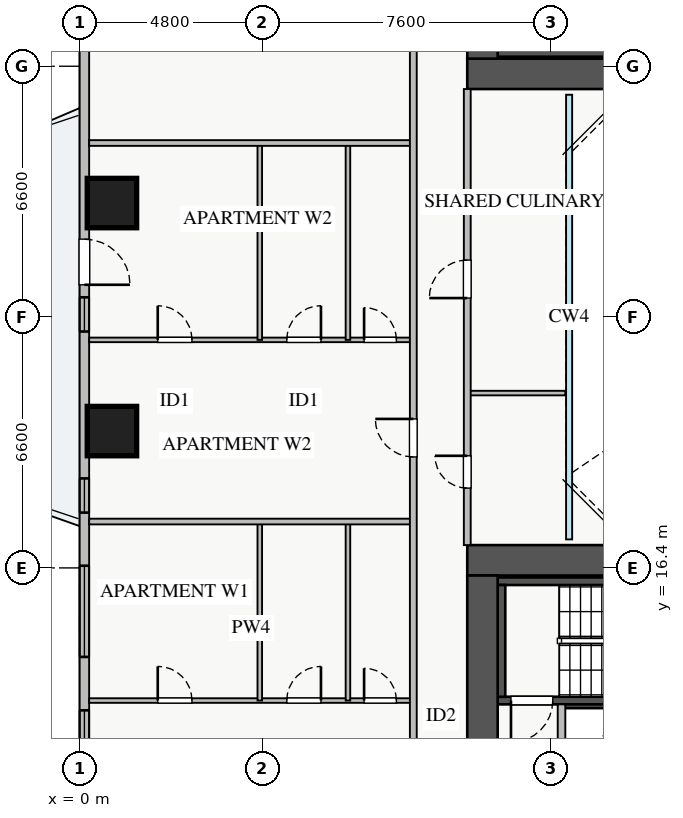
"""IFC4 building model, lengths in metres.
Left out: names, types, materials, properties, quantities, classifications, styles, units other than length and angle.
Written with IfcOpenShell. Run it as: python <this file> out.ifc"""

import sys

from ifc_helpers import new_model, si_unit, direction, frame, frame_2d, origin, origin_2d, place, context, subcontext, project, spatial, rectangle, extrude, source, transform, mapped, element, fill, save


model = new_model("IFC4")
c1 = context("Model", 3, precision=1e-05, world=origin(), true_north=direction((0.0, 1.0)))
c2 = subcontext(c1, "Body", "Model", "MODEL_VIEW")
j1 = project(units=[si_unit("LENGTHUNIT", "METRE"), si_unit("PLANEANGLEUNIT", "RADIAN")], contexts=[c1])
p1 = place(None, origin())
s1 = spatial("IfcSite", under=j1, at=p1, CompositionType="ELEMENT")
p2 = place(p1, origin())
s2 = spatial("IfcBuilding", under=s1, at=p2, CompositionType="ELEMENT")
p3 = place(p2, frame((0.0, 0.0, 69.75)))
s3 = spatial("IfcBuildingStorey", under=s2, at=p3, CompositionType="ELEMENT", Elevation=69.75)
p4 = place(p3, frame((12.68, 12.8, 0.0), z_axis=(0.0, 0.0, 1.0), x_axis=(1.0, 0.0, 0.0)))
e1 = element("IfcWall", 1, at=p4, inside=s3, PredefinedType="SHEAR", context=c2, shape_type="SweptSolid", body=[
    extrude(rectangle(XDim=1.94, YDim=0.18, at=frame_2d((0.97, 0.0))), origin(), (0.0, 0.0, 1.0), 3.07),
])
p5 = place(p3, frame((11.0, 29.95, 0.0), z_axis=(0.0, 0.0, 1.0), x_axis=(1.0, 0.0, 0.0)))
e2 = element("IfcWall", 2, at=p5, inside=s3, PredefinedType="SHEAR", context=c2, shape_type="SweptSolid", body=[
    extrude(rectangle(XDim=7.15, YDim=0.2, at=frame_2d((3.575, 0.0))), origin(), (0.0, 0.0, 1.0), 3.25),
])
p6 = place(p3, frame((11.0, 12.91, 0.0), z_axis=(0.0, 0.0, 1.0), x_axis=(1.0, 0.0, 0.0)))
e3 = element("IfcWall", 3, at=p6, inside=s3, PredefinedType="SHEAR", context=c2, shape_type="SweptSolid", body=[
    extrude(rectangle(XDim=7.15, YDim=0.2, at=frame_2d((3.575, 0.0))), origin(), (0.0, 0.0, 1.0), 3.25),
])
p7 = place(p6, frame((0.35, 0.0, 0.0)))
e4 = element("IfcOpeningElement", 4, at=p7, cuts=e3, PredefinedType="OPENING", context=c2, shape_type="SweptSolid", body=[
    extrude(rectangle(XDim=1.1, YDim=2.05, at=frame_2d((0.55, 1.025))), frame((0.0, 0.11, 0.0), z_axis=(0.0, -1.0, 0.0), x_axis=(1.0, 0.0, 0.0)), (0.0, 0.0, 1.0), 0.22),
])
p8 = place(p3, frame((11.0, 16.05, 0.0), z_axis=(0.0, 0.0, 1.0), x_axis=(1.0, 0.0, 0.0)))
e5 = element("IfcWall", 5, at=p8, inside=s3, PredefinedType="SHEAR", context=c2, shape_type="SweptSolid", body=[
    extrude(rectangle(XDim=7.15, YDim=0.2, at=frame_2d((3.575, 0.0))), origin(), (0.0, 0.0, 1.0), 3.25),
])
p9 = place(p3, frame((11.1, 13.01, 0.0), z_axis=(0.0, 0.0, 1.0), x_axis=(0.0, 1.0, 0.0)))
e6 = element("IfcWall", 6, at=p9, inside=s3, PredefinedType="SHEAR", context=c2, shape_type="SweptSolid", body=[
    extrude(rectangle(XDim=2.94, YDim=0.2, at=frame_2d((1.47, 0.0))), origin(), (0.0, 0.0, 1.0), 3.25),
])
p10 = place(p3, frame((10.2, 29.4, 0.0), z_axis=(0.0, 0.0, 1.0), x_axis=(1.0, 0.0, 0.0)))
e7 = element("IfcWall", 7, at=p10, inside=s3, PredefinedType="SHEAR", context=c2, shape_type="SweptSolid", body=[
    extrude(rectangle(XDim=17.6, YDim=0.8, at=frame_2d((8.8, 0.0))), origin(), (0.0, 0.0, 1.0), 3.25),
])
p11 = place(p3, frame((10.6, 29.8, 0.0), z_axis=(0.0, 0.0, 1.0), x_axis=(0.0, 1.0, 0.0)))
e8 = element("IfcWall", 8, at=p11, inside=s3, PredefinedType="SHEAR", context=c2, shape_type="SweptSolid", body=[
    extrude(rectangle(XDim=5.6, YDim=0.8, at=frame_2d((2.8, 0.0))), origin(), (0.0, 0.0, 1.0), 3.25),
])
p12 = place(p3, frame((10.2, 16.6, 0.0), z_axis=(0.0, 0.0, 1.0), x_axis=(1.0, 0.0, 0.0)))
e9 = element("IfcWall", 9, at=p12, inside=s3, PredefinedType="SHEAR", context=c2, shape_type="SweptSolid", body=[
    extrude(rectangle(XDim=17.6, YDim=0.8, at=frame_2d((8.8, 0.0))), origin(), (0.0, 0.0, 1.0), 3.25),
])
p13 = place(p3, frame((10.6, 10.6, 0.0), z_axis=(0.0, 0.0, 1.0), x_axis=(0.0, 1.0, 0.0)))
e10 = element("IfcWall", 10, at=p13, inside=s3, PredefinedType="SHEAR", context=c2, shape_type="SweptSolid", body=[
    extrude(rectangle(XDim=5.6, YDim=0.8, at=frame_2d((2.8, 0.0))), origin(), (0.0, 0.0, 1.0), 3.25),
])
m1 = source(origin(), c2, "Body", "SweptSolid", [
    extrude(rectangle(XDim=1.3, YDim=1.3, at=origin_2d()), origin(), (0.0, 0.0, 1.0), 3.25),
])
for number, where, z_axis, x_axis in (
    (11, (0.85, 26.0, 0.0), (0.0, 0.0, 1.0), (1.0, 0.0, 0.0)),
    (12, (0.85, 20.0, 0.0), (0.0, 0.0, 1.0), (1.0, 0.0, 0.0)),
):
    element("IfcColumn", number, at=place(p3, frame(where, z_axis=z_axis, x_axis=x_axis)), inside=s3, PredefinedType="COLUMN", context=c2, shape_type="MappedRepresentation", body=[
        mapped(m1, transform((0.0, 0.0, 0.0), x_axis=(1.0, 0.0, 0.0), y_axis=(0.0, 1.0, 0.0), z_axis=(0.0, 0.0, 1.0), scale=1.0)),
    ])
p14 = place(p3, frame((0.125, 9.45, 0.0), z_axis=(0.0, 0.0, 1.0), x_axis=(0.0, 1.0, 0.0)))
e13 = element("IfcWall", 13, at=p14, inside=s3, PredefinedType="STANDARD", context=c2, shape_type="SweptSolid", body=[
    extrude(rectangle(XDim=27.1, YDim=0.25, at=frame_2d((13.55, 0.0))), origin(), (0.0, 0.0, 1.0), 2.61),
])
p15 = place(p14, frame((14.4, 0.0, 0.0)))
e14 = element("IfcOpeningElement", 14, at=p15, cuts=e13, PredefinedType="OPENING", context=c2, shape_type="SweptSolid", body=[
    extrude(rectangle(XDim=1.2, YDim=2.1, at=frame_2d((0.6, 1.05))), frame((0.0, 0.135, 0.0), z_axis=(0.0, -1.0, 0.0), x_axis=(1.0, 0.0, 0.0)), (0.0, 0.0, 1.0), 0.27),
])
p16 = place(p14, frame((1.403, 0.0, 0.9)))
e15 = element("IfcOpeningElement", 15, at=p16, cuts=e13, PredefinedType="OPENING", context=c2, shape_type="SweptSolid", body=[
    extrude(rectangle(XDim=1.8, YDim=1.5, at=frame_2d((0.9, 0.75))), frame((0.0, 0.135, 0.0), z_axis=(0.0, -1.0, 0.0), x_axis=(1.0, 0.0, 0.0)), (0.0, 0.0, 1.0), 0.27),
])
p17 = place(p14, frame((22.663, 0.0, 0.9)))
e16 = element("IfcOpeningElement", 16, at=p17, cuts=e13, PredefinedType="OPENING", context=c2, shape_type="SweptSolid", body=[
    extrude(rectangle(XDim=2.1, YDim=1.48, at=frame_2d((1.05, 0.74))), frame((0.0, 0.135, 0.0), z_axis=(0.0, -1.0, 0.0), x_axis=(1.0, 0.0, 0.0)), (0.0, 0.0, 1.0), 0.27),
])
p18 = place(p14, frame((4.607, 0.0, 0.9)))
e17 = element("IfcOpeningElement", 17, at=p18, cuts=e13, PredefinedType="OPENING", context=c2, shape_type="SweptSolid", body=[
    extrude(rectangle(XDim=2.4, YDim=1.5, at=frame_2d((1.2, 0.75))), frame((0.0, 0.135, 0.0), z_axis=(0.0, -1.0, 0.0), x_axis=(1.0, 0.0, 0.0)), (0.0, 0.0, 1.0), 0.27),
])
p19 = place(p14, frame((13.17, 0.0, 0.9)))
e18 = element("IfcOpeningElement", 18, at=p19, cuts=e13, PredefinedType="OPENING", context=c2, shape_type="SweptSolid", body=[
    extrude(rectangle(XDim=0.9, YDim=1.2, at=frame_2d((0.45, 0.6))), frame((0.0, 0.135, 0.0), z_axis=(0.0, -1.0, 0.0), x_axis=(1.0, 0.0, 0.0)), (0.0, 0.0, 1.0), 0.27),
])
p20 = place(p14, frame((8.405, 0.0, 0.9)))
e19 = element("IfcOpeningElement", 19, at=p20, cuts=e13, PredefinedType="OPENING", context=c2, shape_type="SweptSolid", body=[
    extrude(rectangle(XDim=0.9, YDim=1.2, at=frame_2d((0.45, 0.6))), frame((0.0, 0.135, 0.0), z_axis=(0.0, -1.0, 0.0), x_axis=(1.0, 0.0, 0.0)), (0.0, 0.0, 1.0), 0.27),
])
p21 = place(p3, frame((12.68, 10.6, 0.0), z_axis=(0.0, 0.0, 1.0), x_axis=(0.0, 1.0, 0.0)))
e20 = element("IfcWall", 20, at=p21, inside=s3, PredefinedType="PARTITIONING", context=c2, shape_type="SweptSolid", body=[
    extrude(rectangle(XDim=2.21, YDim=0.2, at=frame_2d((1.105, 0.0))), origin(), (0.0, 0.0, 1.0), 3.07),
])
p22 = place(p3, frame((0.25, 12.91, 0.0), z_axis=(0.0, 0.0, 1.0), x_axis=(1.0, 0.0, 0.0)))
e21 = element("IfcWall", 21, at=p22, inside=s3, PredefinedType="PLUMBINGWALL", context=c2, shape_type="SweptSolid", body=[
    extrude(rectangle(XDim=8.53, YDim=0.12, at=frame_2d((4.265, 0.0))), origin(), (0.0, 0.0, 1.0), 3.07),
])
p23 = place(p22, frame((1.805, 0.0, 0.0)))
e22 = element("IfcOpeningElement", 22, at=p23, cuts=e21, PredefinedType="OPENING", context=c2, shape_type="SweptSolid", body=[
    extrude(rectangle(XDim=0.9, YDim=2.05, at=frame_2d((0.45, 1.025))), frame((0.0, 0.07, 0.0), z_axis=(0.0, -1.0, 0.0), x_axis=(1.0, 0.0, 0.0)), (0.0, 0.0, 1.0), 0.14),
])
p24 = place(p22, frame((5.2, 0.0, 0.0)))
e23 = element("IfcOpeningElement", 23, at=p24, cuts=e21, PredefinedType="OPENING", context=c2, shape_type="SweptSolid", body=[
    extrude(rectangle(XDim=0.9, YDim=2.05, at=frame_2d((0.45, 1.025))), frame((0.0, 0.07, 0.0), z_axis=(0.0, -1.0, 0.0), x_axis=(1.0, 0.0, 0.0)), (0.0, 0.0, 1.0), 0.14),
])
p25 = place(p22, frame((7.235, 0.0, 0.0)))
e24 = element("IfcOpeningElement", 24, at=p25, cuts=e21, PredefinedType="OPENING", context=c2, shape_type="SweptSolid", body=[
    extrude(rectangle(XDim=0.85, YDim=2.05, at=frame_2d((0.425, 1.025))), frame((0.0, 0.07, 0.0), z_axis=(0.0, -1.0, 0.0), x_axis=(1.0, 0.0, 0.0)), (0.0, 0.0, 1.0), 0.14),
])
for number, where, z_axis, x_axis in (
    (25, (4.74, 12.91, 0.0), (0.0, 0.0, 1.0), (0.0, 1.0, 0.0)),
    (26, (7.06, 12.91, 0.0), (0.0, 0.0, 1.0), (0.0, 1.0, 0.0)),
):
    element("IfcWall", number, at=place(p3, frame(where, z_axis=z_axis, x_axis=x_axis)), inside=s3, PredefinedType="PLUMBINGWALL", context=c2, shape_type="SweptSolid", body=[
        extrude(rectangle(XDim=4.71, YDim=0.12, at=frame_2d((2.355, 0.0))), origin(), (0.0, 0.0, 1.0), 3.07),
    ])
p26 = place(p3, frame((0.25, 22.4, 0.0), z_axis=(0.0, 0.0, 1.0), x_axis=(1.0, 0.0, 0.0)))
e27 = element("IfcWall", 27, at=p26, inside=s3, PredefinedType="PLUMBINGWALL", context=c2, shape_type="SweptSolid", body=[
    extrude(rectangle(XDim=8.53, YDim=0.12, at=frame_2d((4.265, 0.0))), origin(), (0.0, 0.0, 1.0), 3.07),
])
p27 = place(p26, frame((1.805, 0.0, 0.0)))
e28 = element("IfcOpeningElement", 28, at=p27, cuts=e27, PredefinedType="OPENING", context=c2, shape_type="SweptSolid", body=[
    extrude(rectangle(XDim=0.9, YDim=2.05, at=frame_2d((0.45, 1.025))), frame((0.0, 0.07, 0.0), z_axis=(0.0, -1.0, 0.0), x_axis=(1.0, 0.0, 0.0)), (0.0, 0.0, 1.0), 0.14),
])
p28 = place(p26, frame((5.2, 0.0, 0.0)))
e29 = element("IfcOpeningElement", 29, at=p28, cuts=e27, PredefinedType="OPENING", context=c2, shape_type="SweptSolid", body=[
    extrude(rectangle(XDim=0.9, YDim=2.05, at=frame_2d((0.45, 1.025))), frame((0.0, 0.07, 0.0), z_axis=(0.0, -1.0, 0.0), x_axis=(1.0, 0.0, 0.0)), (0.0, 0.0, 1.0), 0.14),
])
p29 = place(p26, frame((7.235, 0.0, 0.0)))
e30 = element("IfcOpeningElement", 30, at=p29, cuts=e27, PredefinedType="OPENING", context=c2, shape_type="SweptSolid", body=[
    extrude(rectangle(XDim=0.85, YDim=2.05, at=frame_2d((0.425, 1.025))), frame((0.0, 0.07, 0.0), z_axis=(0.0, -1.0, 0.0), x_axis=(1.0, 0.0, 0.0)), (0.0, 0.0, 1.0), 0.14),
])
for number, where, z_axis, x_axis in (
    (31, (4.74, 22.4, 0.0), (0.0, 0.0, 1.0), (0.0, 1.0, 0.0)),
    (32, (7.06, 22.4, 0.0), (0.0, 0.0, 1.0), (0.0, 1.0, 0.0)),
):
    element("IfcWall", number, at=place(p3, frame(where, z_axis=z_axis, x_axis=x_axis)), inside=s3, PredefinedType="PLUMBINGWALL", context=c2, shape_type="SweptSolid", body=[
        extrude(rectangle(XDim=5.18, YDim=0.12, at=frame_2d((2.59, 0.0))), origin(), (0.0, 0.0, 1.0), 3.07),
    ])
p30 = place(p3, frame((0.25, 17.62, 0.0), z_axis=(0.0, 0.0, 1.0), x_axis=(1.0, 0.0, 0.0)))
e33 = element("IfcWall", 33, at=p30, inside=s3, PredefinedType="PARTITIONING", context=c2, shape_type="SweptSolid", body=[
    extrude(rectangle(XDim=8.53, YDim=0.15, at=frame_2d((4.265, 0.0))), origin(), (0.0, 0.0, 1.0), 3.07),
])
p31 = place(p3, frame((0.25, 27.58, 0.0), z_axis=(0.0, 0.0, 1.0), x_axis=(1.0, 0.0, 0.0)))
e34 = element("IfcWall", 34, at=p31, inside=s3, PredefinedType="PARTITIONING", context=c2, shape_type="SweptSolid", body=[
    extrude(rectangle(XDim=8.53, YDim=0.15, at=frame_2d((4.265, 0.0))), origin(), (0.0, 0.0, 1.0), 2.821),
])
p32 = place(p3, frame((8.78, 7.21, 0.0), z_axis=(0.0, 0.0, 1.0), x_axis=(0.0, 1.0, 0.0)))
e35 = element("IfcWall", 35, at=p32, inside=s3, PredefinedType="PARTITIONING", context=c2, shape_type="SweptSolid", body=[
    extrude(rectangle(XDim=31.23, YDim=0.18, at=frame_2d((15.615, 0.0))), origin(), (0.0, 0.0, 1.0), 3.07),
])
p33 = place(p32, frame((30.09, 0.0, 0.0)))
e36 = element("IfcOpeningElement", 36, at=p33, cuts=e35, PredefinedType="OPENING", context=c2, shape_type="SweptSolid", body=[
    extrude(rectangle(XDim=0.9, YDim=2.05, at=frame_2d((0.45, 1.025))), frame((0.0, 0.1, 0.0), z_axis=(0.0, -1.0, 0.0), x_axis=(1.0, 0.0, 0.0)), (0.0, 0.0, 1.0), 0.2),
])
p34 = place(p32, frame((0.24, 0.0, 0.0)))
e37 = element("IfcOpeningElement", 37, at=p34, cuts=e35, PredefinedType="OPENING", context=c2, shape_type="SweptSolid", body=[
    extrude(rectangle(XDim=0.9, YDim=2.05, at=frame_2d((0.45, 1.025))), frame((0.0, 0.1, 0.0), z_axis=(0.0, -1.0, 0.0), x_axis=(1.0, 0.0, 0.0)), (0.0, 0.0, 1.0), 0.2),
])
p35 = place(p32, frame((2.84, 0.0, 0.0)))
e38 = element("IfcOpeningElement", 38, at=p35, cuts=e35, PredefinedType="OPENING", context=c2, shape_type="SweptSolid", body=[
    extrude(rectangle(XDim=1.0, YDim=2.05, at=frame_2d((0.5, 1.025))), frame((0.0, 0.1, 0.0), z_axis=(0.0, -1.0, 0.0), x_axis=(1.0, 0.0, 0.0)), (0.0, 0.0, 1.0), 0.2),
])
p36 = place(p32, frame((12.11, 0.0, 0.0)))
e39 = element("IfcOpeningElement", 39, at=p36, cuts=e35, PredefinedType="OPENING", context=c2, shape_type="SweptSolid", body=[
    extrude(rectangle(XDim=1.0, YDim=2.05, at=frame_2d((0.5, 1.025))), frame((0.0, 0.1, 0.0), z_axis=(0.0, -1.0, 0.0), x_axis=(1.0, 0.0, 0.0)), (0.0, 0.0, 1.0), 0.2),
])
p37 = place(p32, frame((24.62, 0.0, 0.0)))
e40 = element("IfcOpeningElement", 40, at=p37, cuts=e35, PredefinedType="OPENING", context=c2, shape_type="SweptSolid", body=[
    extrude(rectangle(XDim=1.0, YDim=2.05, at=frame_2d((0.5, 1.025))), frame((0.0, 0.1, 0.0), z_axis=(0.0, -1.0, 0.0), x_axis=(1.0, 0.0, 0.0)), (0.0, 0.0, 1.0), 0.2),
])
p38 = place(p3, frame((10.2, 21.0, 0.0), z_axis=(0.0, 0.0, 1.0), x_axis=(1.0, 0.0, 0.0)))
e41 = element("IfcWall", 41, at=p38, inside=s3, PredefinedType="PLUMBINGWALL", context=c2, shape_type="SweptSolid", body=[
    extrude(rectangle(XDim=2.58, YDim=0.12, at=frame_2d((1.29, 0.0))), origin(), (0.0, 0.0, 1.0), 3.07),
])
p39 = place(p3, frame((10.2, 17.0, 0.0), z_axis=(0.0, 0.0, 1.0), x_axis=(0.0, 1.0, 0.0)))
e42 = element("IfcWall", 42, at=p39, inside=s3, PredefinedType="PARTITIONING", context=c2, shape_type="SweptSolid", body=[
    extrude(rectangle(XDim=12.0, YDim=0.18, at=frame_2d((6.0, 0.0))), origin(), (0.0, 0.0, 1.0), 3.07),
])
p40 = place(p39, frame((1.5, 0.0, 0.0)))
e43 = element("IfcOpeningElement", 43, at=p40, cuts=e42, PredefinedType="OPENING", context=c2, shape_type="SweptSolid", body=[
    extrude(rectangle(XDim=0.85, YDim=2.05, at=frame_2d((0.425, 1.025))), frame((0.0, 0.1, 0.0), z_axis=(0.0, -1.0, 0.0), x_axis=(1.0, 0.0, 0.0)), (0.0, 0.0, 1.0), 0.2),
])
p41 = place(p39, frame((6.5, 0.0, 0.0)))
e44 = element("IfcOpeningElement", 44, at=p41, cuts=e42, PredefinedType="OPENING", context=c2, shape_type="SweptSolid", body=[
    extrude(rectangle(XDim=1.0, YDim=2.05, at=frame_2d((0.5, 1.025))), frame((0.0, 0.1, 0.0), z_axis=(0.0, -1.0, 0.0), x_axis=(1.0, 0.0, 0.0)), (0.0, 0.0, 1.0), 0.2),
])
m2 = source(origin(), c2, "Body", "SweptSolid", [
    extrude(rectangle(XDim=1.2, YDim=2.1, at=frame_2d((0.6, 1.05))), frame((0.0, 0.025, 0.0), z_axis=(0.0, -1.0, 0.0), x_axis=(1.0, 0.0, 0.0)), (0.0, 0.0, 1.0), 0.05),
])
p42 = place(p15, frame((1.2, 0.0, 0.0), z_axis=(0.0, 0.0, 1.0), x_axis=(-1.0, 0.0, 0.0)))
e45 = element("IfcDoor", 45, at=p42, inside=s3, OperationType="SINGLE_SWING_LEFT", PredefinedType="DOOR", context=c2, shape_type="MappedRepresentation", body=[
    mapped(m2, transform((0.0, 0.0, 0.0), x_axis=(1.0, 0.0, 0.0), y_axis=(0.0, 1.0, 0.0), z_axis=(0.0, 0.0, 1.0), scale=1.0)),
])
fill(e14, e45)
m3 = source(origin(), c2, "Body", "SweptSolid", [
    extrude(rectangle(XDim=1.8, YDim=1.5, at=frame_2d((0.9, 0.75))), frame((0.0, 0.03, 0.0), z_axis=(0.0, -1.0, 0.0), x_axis=(1.0, 0.0, 0.0)), (0.0, 0.0, 1.0), 0.06),
])
p43 = place(p16, origin())
e46 = element("IfcWindow", 46, at=p43, inside=s3, PartitioningType="TRIPLE_PANEL_VERTICAL", PredefinedType="WINDOW", context=c2, shape_type="MappedRepresentation", body=[
    mapped(m3, transform((0.0, 0.0, 0.0), x_axis=(1.0, 0.0, 0.0), y_axis=(0.0, 1.0, 0.0), z_axis=(0.0, 0.0, 1.0), scale=1.0)),
])
fill(e15, e46)
m4 = source(origin(), c2, "Body", "SweptSolid", [
    extrude(rectangle(XDim=1.1, YDim=2.05, at=frame_2d((0.55, 1.025))), frame((0.0, 0.025, 0.0), z_axis=(0.0, -1.0, 0.0), x_axis=(1.0, 0.0, 0.0)), (0.0, 0.0, 1.0), 0.05),
])
p44 = place(p7, frame((1.1, 0.0, 0.0), z_axis=(0.0, 0.0, 1.0), x_axis=(-1.0, 0.0, 0.0)))
e47 = element("IfcDoor", 47, at=p44, inside=s3, OperationType="SINGLE_SWING_LEFT", PredefinedType="DOOR", context=c2, shape_type="MappedRepresentation", body=[
    mapped(m4, transform((0.0, 0.0, 0.0), x_axis=(1.0, 0.0, 0.0), y_axis=(0.0, 1.0, 0.0), z_axis=(0.0, 0.0, 1.0), scale=1.0)),
])
fill(e4, e47)
m5 = source(origin(), c2, "Body", "SweptSolid", [
    extrude(rectangle(XDim=0.9, YDim=2.05, at=frame_2d((0.45, 1.025))), frame((0.0, 0.025, 0.0), z_axis=(0.0, -1.0, 0.0), x_axis=(1.0, 0.0, 0.0)), (0.0, 0.0, 1.0), 0.05),
])
p45 = place(p23, origin())
e48 = element("IfcDoor", 48, at=p45, inside=s3, OperationType="SINGLE_SWING_LEFT", PredefinedType="DOOR", context=c2, shape_type="MappedRepresentation", body=[
    mapped(m5, transform((0.0, 0.0, 0.0), x_axis=(1.0, 0.0, 0.0), y_axis=(0.0, 1.0, 0.0), z_axis=(0.0, 0.0, 1.0), scale=1.0)),
])
fill(e22, e48)
p46 = place(p24, origin())
e49 = element("IfcDoor", 49, at=p46, inside=s3, OperationType="SINGLE_SWING_RIGHT", PredefinedType="DOOR", context=c2, shape_type="MappedRepresentation", body=[
    mapped(m5, transform((0.0, 0.0, 0.0), x_axis=(1.0, 0.0, 0.0), y_axis=(0.0, 1.0, 0.0), z_axis=(0.0, 0.0, 1.0), scale=1.0)),
])
fill(e23, e49)
m6 = source(origin(), c2, "Body", "SweptSolid", [
    extrude(rectangle(XDim=0.85, YDim=2.05, at=frame_2d((0.425, 1.025))), frame((0.0, 0.025, 0.0), z_axis=(0.0, -1.0, 0.0), x_axis=(1.0, 0.0, 0.0)), (0.0, 0.0, 1.0), 0.05),
])
p47 = place(p25, origin())
e50 = element("IfcDoor", 50, at=p47, inside=s3, OperationType="SINGLE_SWING_LEFT", PredefinedType="DOOR", context=c2, shape_type="MappedRepresentation", body=[
    mapped(m6, transform((0.0, 0.0, 0.0), x_axis=(1.0, 0.0, 0.0), y_axis=(0.0, 1.0, 0.0), z_axis=(0.0, 0.0, 1.0), scale=1.0)),
])
fill(e24, e50)
p48 = place(p27, origin())
e51 = element("IfcDoor", 51, at=p48, inside=s3, OperationType="SINGLE_SWING_LEFT", PredefinedType="DOOR", context=c2, shape_type="MappedRepresentation", body=[
    mapped(m5, transform((0.0, 0.0, 0.0), x_axis=(1.0, 0.0, 0.0), y_axis=(0.0, 1.0, 0.0), z_axis=(0.0, 0.0, 1.0), scale=1.0)),
])
fill(e28, e51)
p49 = place(p28, origin())
e52 = element("IfcDoor", 52, at=p49, inside=s3, OperationType="SINGLE_SWING_RIGHT", PredefinedType="DOOR", context=c2, shape_type="MappedRepresentation", body=[
    mapped(m5, transform((0.0, 0.0, 0.0), x_axis=(1.0, 0.0, 0.0), y_axis=(0.0, 1.0, 0.0), z_axis=(0.0, 0.0, 1.0), scale=1.0)),
])
fill(e29, e52)
p50 = place(p29, origin())
e53 = element("IfcDoor", 53, at=p50, inside=s3, OperationType="SINGLE_SWING_LEFT", PredefinedType="DOOR", context=c2, shape_type="MappedRepresentation", body=[
    mapped(m6, transform((0.0, 0.0, 0.0), x_axis=(1.0, 0.0, 0.0), y_axis=(0.0, 1.0, 0.0), z_axis=(0.0, 0.0, 1.0), scale=1.0)),
])
fill(e30, e53)
m7 = source(origin(), c2, "Body", "SweptSolid", [
    extrude(rectangle(XDim=1.0, YDim=2.05, at=frame_2d((0.5, 1.025))), frame((0.0, 0.025, 0.0), z_axis=(0.0, -1.0, 0.0), x_axis=(1.0, 0.0, 0.0)), (0.0, 0.0, 1.0), 0.05),
])
p51 = place(p36, origin())
e54 = element("IfcDoor", 54, at=p51, inside=s3, OperationType="SINGLE_SWING_RIGHT", PredefinedType="DOOR", context=c2, shape_type="MappedRepresentation", body=[
    mapped(m7, transform((0.0, 0.0, 0.0), x_axis=(1.0, 0.0, 0.0), y_axis=(0.0, 1.0, 0.0), z_axis=(0.0, 0.0, 1.0), scale=1.0)),
])
fill(e39, e54)
p52 = place(p40, origin())
e55 = element("IfcDoor", 55, at=p52, inside=s3, OperationType="SINGLE_SWING_RIGHT", PredefinedType="DOOR", context=c2, shape_type="MappedRepresentation", body=[
    mapped(m6, transform((0.0, 0.0, 0.0), x_axis=(1.0, 0.0, 0.0), y_axis=(0.0, 1.0, 0.0), z_axis=(0.0, 0.0, 1.0), scale=1.0)),
])
fill(e43, e55)
p53 = place(p41, origin())
e56 = element("IfcDoor", 56, at=p53, inside=s3, OperationType="SINGLE_SWING_LEFT", PredefinedType="DOOR", context=c2, shape_type="MappedRepresentation", body=[
    mapped(m7, transform((0.0, 0.0, 0.0), x_axis=(1.0, 0.0, 0.0), y_axis=(0.0, 1.0, 0.0), z_axis=(0.0, 0.0, 1.0), scale=1.0)),
])
fill(e44, e56)
m8 = source(origin(), c2, "Body", "SweptSolid", [
    extrude(rectangle(XDim=2.4, YDim=1.5, at=frame_2d((1.2, 0.75))), frame((0.0, 0.03, 0.0), z_axis=(0.0, -1.0, 0.0), x_axis=(1.0, 0.0, 0.0)), (0.0, 0.0, 1.0), 0.06),
])
p54 = place(p18, origin())
e57 = element("IfcWindow", 57, at=p54, inside=s3, PartitioningType="TRIPLE_PANEL_VERTICAL", PredefinedType="WINDOW", context=c2, shape_type="MappedRepresentation", body=[
    mapped(m8, transform((0.0, 0.0, 0.0), x_axis=(1.0, 0.0, 0.0), y_axis=(0.0, 1.0, 0.0), z_axis=(0.0, 0.0, 1.0), scale=1.0)),
])
fill(e17, e57)
m9 = source(origin(), c2, "Body", "SweptSolid", [
    extrude(rectangle(XDim=0.9, YDim=1.2, at=frame_2d((0.45, 0.6))), frame((0.0, 0.03, 0.0), z_axis=(0.0, -1.0, 0.0), x_axis=(1.0, 0.0, 0.0)), (0.0, 0.0, 1.0), 0.06),
])
p55 = place(p19, origin())
e58 = element("IfcWindow", 58, at=p55, inside=s3, PartitioningType="SINGLE_PANEL", PredefinedType="WINDOW", context=c2, shape_type="MappedRepresentation", body=[
    mapped(m9, transform((0.0, 0.0, 0.0), x_axis=(1.0, 0.0, 0.0), y_axis=(0.0, 1.0, 0.0), z_axis=(0.0, 0.0, 1.0), scale=1.0)),
])
fill(e18, e58)
p56 = place(p20, origin())
e59 = element("IfcWindow", 59, at=p56, inside=s3, PartitioningType="SINGLE_PANEL", PredefinedType="WINDOW", context=c2, shape_type="MappedRepresentation", body=[
    mapped(m9, transform((0.0, 0.0, 0.0), x_axis=(1.0, 0.0, 0.0), y_axis=(0.0, 1.0, 0.0), z_axis=(0.0, 0.0, 1.0), scale=1.0)),
])
fill(e19, e59)
save(model, sys.argv[1])
